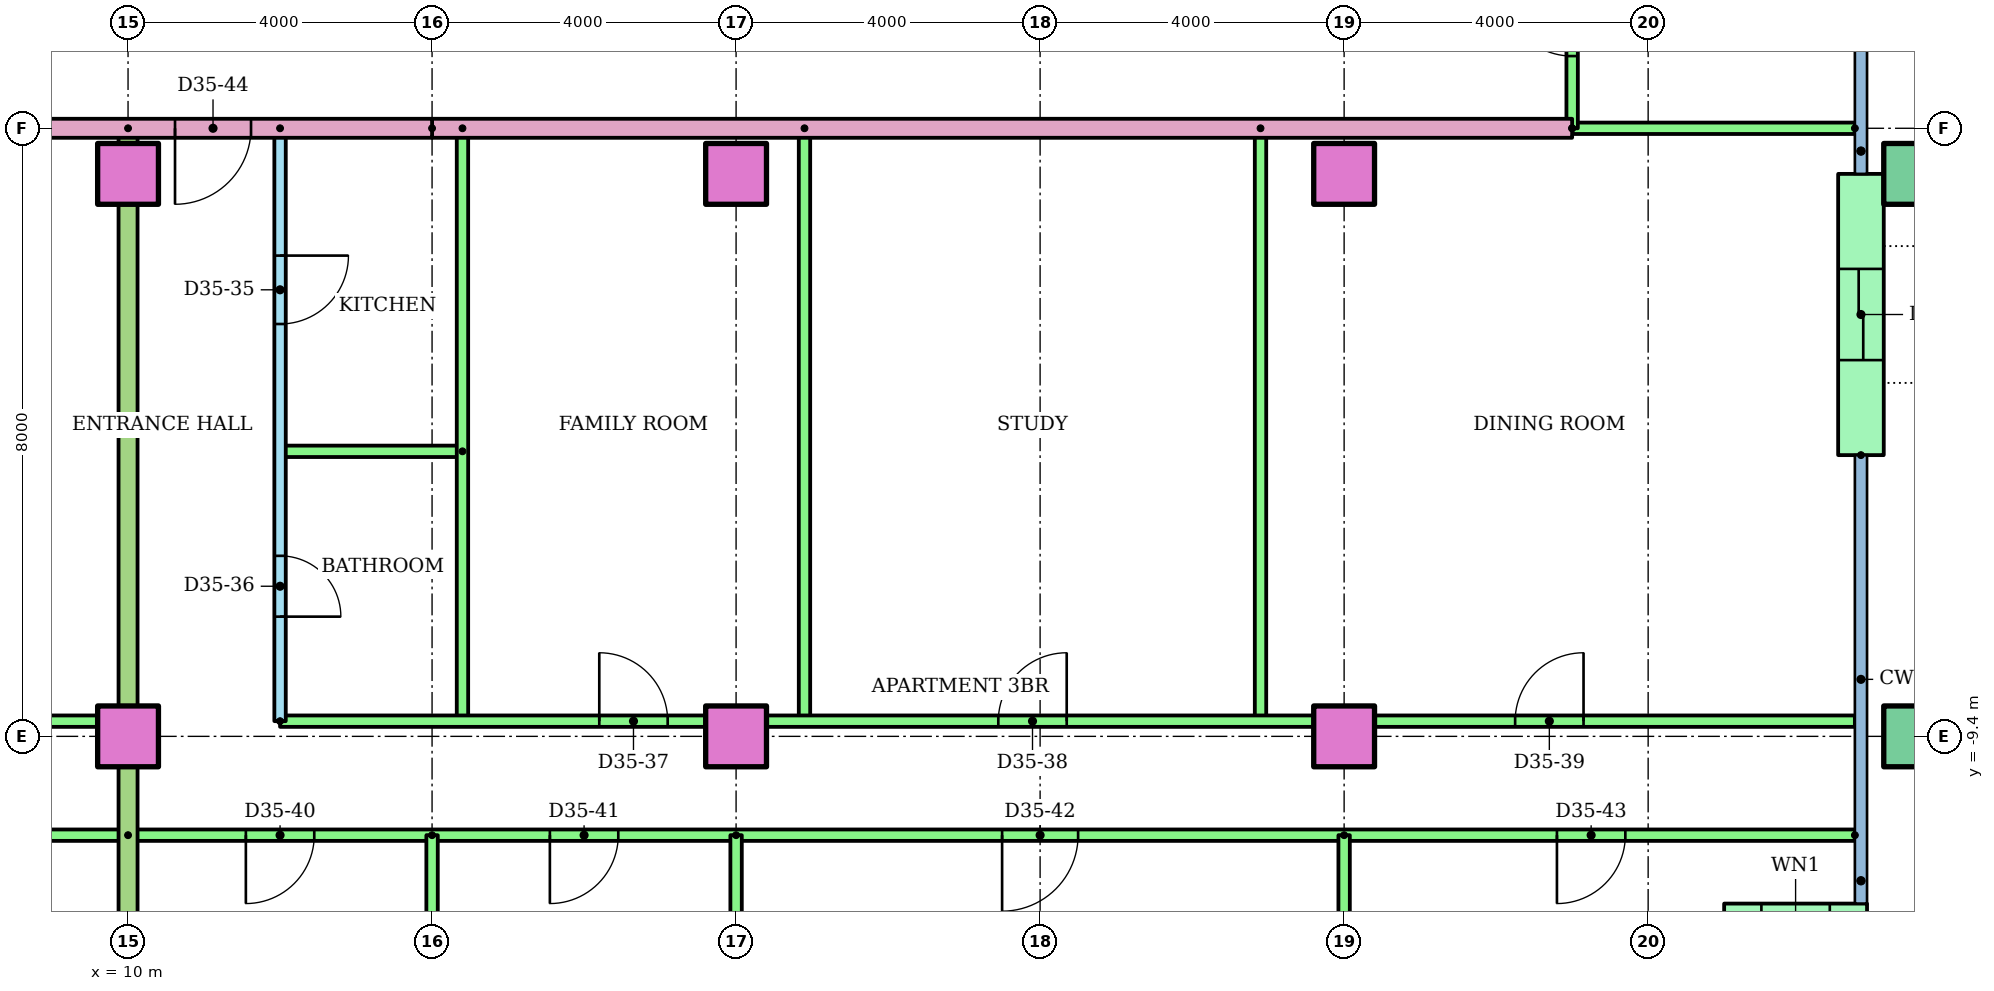
"""IFC4 building model, lengths in metres.
Left out: names, types, materials, properties, quantities, classifications, styles, units other than length and angle.
Written with IfcOpenShell. Run it as: python <this file> out.ifc"""

import sys

from ifc_helpers import new_model, si_unit, direction, frame, frame_2d, origin, origin_2d, place, context, subcontext, project, spatial, rectangle, hollow_rectangle, extrude, element, fill, save


model = new_model("IFC4")
c1 = context("Model", 3, precision=1e-05, world=origin(), true_north=direction((0.0, 1.0)))
c2 = subcontext(c1, "Body", "Model", "MODEL_VIEW")
j1 = project(units=[si_unit("LENGTHUNIT", "METRE"), si_unit("PLANEANGLEUNIT", "RADIAN")], contexts=[c1])
p1 = place(None, origin())
s1 = spatial("IfcSite", under=j1, at=p1, CompositionType="ELEMENT")
p2 = place(p1, origin())
s2 = spatial("IfcBuilding", under=s1, at=p2, CompositionType="ELEMENT")
p3 = place(p2, frame((0.0, 0.0, 135.8)))
s3 = spatial("IfcBuildingStorey", under=s2, at=p3, CompositionType="ELEMENT", Elevation=135.8)
for number, where in (
    (1, (10.0, -9.4, 0.0)),
    (2, (18.0, -9.4, 0.0)),
    (3, (26.0, -9.4, 0.0)),
):
    element("IfcColumn", number, at=place(p3, frame(where)), inside=s3, PredefinedType="COLUMN", context=c2, shape_type="SweptSolid", body=[
        extrude(rectangle(XDim=0.8, YDim=0.8, at=origin_2d()), origin(), (0.0, 0.0, 1.0), 3.2),
    ])
p4 = place(p3, frame((33.5, -9.4, 0.0)))
e4 = element("IfcColumn", 4, at=p4, inside=s3, PredefinedType="COLUMN", context=c2, shape_type="SweptSolid", body=[
    extrude(hollow_rectangle(XDim=0.8, YDim=0.8, WallThickness=0.04, at=origin_2d()), origin(), (0.0, 0.0, 1.0), 3.2),
])
for number, where in (
    (5, (10.0, -2.0, 0.0)),
    (6, (18.0, -2.0, 0.0)),
    (7, (26.0, -2.0, 0.0)),
):
    element("IfcColumn", number, at=place(p3, frame(where)), inside=s3, PredefinedType="COLUMN", context=c2, shape_type="SweptSolid", body=[
        extrude(rectangle(XDim=0.8, YDim=0.8, at=origin_2d()), origin(), (0.0, 0.0, 1.0), 3.2),
    ])
p5 = place(p3, frame((33.5, -2.0, 0.0)))
e8 = element("IfcColumn", 8, at=p5, inside=s3, PredefinedType="COLUMN", context=c2, shape_type="SweptSolid", body=[
    extrude(hollow_rectangle(XDim=0.8, YDim=0.8, WallThickness=0.04, at=origin_2d()), origin(), (0.0, 0.0, 1.0), 3.2),
])
p6 = place(p3, frame((31.0, -11.9, 0.0)))
e9 = element("IfcWall", 9, at=p6, inside=s3, PredefinedType="STANDARD", context=c2, shape_type="SweptSolid", body=[
    extrude(rectangle(XDim=1.88, YDim=0.6, at=frame_2d((0.94, 0.0))), origin(), (0.0, 0.0, 1.0), 2.92),
])
p7 = place(p6, frame((0.49, 0.0, 0.9)))
e10 = element("IfcOpeningElement", 10, at=p7, cuts=e9, PredefinedType="OPENING", context=c2, shape_type="SweptSolid", body=[
    extrude(rectangle(XDim=0.9, YDim=1.5, at=frame_2d((0.45, 0.75))), frame((0.0, 0.31, 0.0), z_axis=(0.0, -1.0, 0.0), x_axis=(1.0, 0.0, 0.0)), (0.0, 0.0, 1.0), 0.62),
])
p8 = place(p3, frame((32.8, -5.7, 0.0), z_axis=(0.0, 0.0, 1.0), x_axis=(0.0, 1.0, 0.0)))
e11 = element("IfcWall", 11, at=p8, inside=s3, PredefinedType="STANDARD", context=c2, shape_type="SweptSolid", body=[
    extrude(rectangle(XDim=3.7, YDim=0.6, at=frame_2d((1.85, 0.0))), origin(), (0.0, 0.0, 1.0), 2.92),
])
p9 = place(p8, frame((1.25, 0.0, 0.0)))
e12 = element("IfcOpeningElement", 12, at=p9, cuts=e11, PredefinedType="OPENING", context=c2, shape_type="SweptSolid", body=[
    extrude(rectangle(XDim=1.2, YDim=2.1, at=frame_2d((0.6, 1.05))), frame((0.0, 0.31, 0.0), z_axis=(0.0, -1.0, 0.0), x_axis=(1.0, 0.0, 0.0)), (0.0, 0.0, 1.0), 0.62),
])
p10 = place(p3, frame((-4.0, -9.2, 0.0)))
e13 = element("IfcWall", 13, at=p10, inside=s3, PredefinedType="PARTITIONING", context=c2, shape_type="SweptSolid", body=[
    extrude(rectangle(XDim=14.0, YDim=0.15, at=frame_2d((7.0, 0.0))), origin(), (0.0, 0.0, 1.0), 2.4),
])
p11 = place(p10, frame((3.45, 0.0, 0.0)))
e14 = element("IfcOpeningElement", 14, at=p11, cuts=e13, PredefinedType="OPENING", context=c2, shape_type="SweptSolid", body=[
    extrude(rectangle(XDim=0.9, YDim=2.1, at=frame_2d((0.45, 1.05))), frame((0.0, 0.085, 0.0), z_axis=(0.0, -1.0, 0.0), x_axis=(1.0, 0.0, 0.0)), (0.0, 0.0, 1.0), 0.17),
])
p12 = place(p10, frame((6.825, 0.0, 0.0)))
e15 = element("IfcOpeningElement", 15, at=p12, cuts=e13, PredefinedType="OPENING", context=c2, shape_type="SweptSolid", body=[
    extrude(rectangle(XDim=0.9, YDim=2.1, at=frame_2d((0.45, 1.05))), frame((0.0, 0.085, 0.0), z_axis=(0.0, -1.0, 0.0), x_axis=(1.0, 0.0, 0.0)), (0.0, 0.0, 1.0), 0.17),
])
p13 = place(p10, frame((11.125, 0.0, 0.0)))
e16 = element("IfcOpeningElement", 16, at=p13, cuts=e13, PredefinedType="OPENING", context=c2, shape_type="SweptSolid", body=[
    extrude(rectangle(XDim=0.9, YDim=2.1, at=frame_2d((0.45, 1.05))), frame((0.0, 0.085, 0.0), z_axis=(0.0, -1.0, 0.0), x_axis=(1.0, 0.0, 0.0)), (0.0, 0.0, 1.0), 0.17),
])
p14 = place(p3, frame((10.0, -10.7, 0.0), z_axis=(0.0, 0.0, 1.0), x_axis=(-1.0, 0.0, 0.0)))
e17 = element("IfcWall", 17, at=p14, inside=s3, PredefinedType="PARTITIONING", context=c2, shape_type="SweptSolid", body=[
    extrude(rectangle(XDim=16.0, YDim=0.15, at=frame_2d((8.0, 0.0))), origin(), (0.0, 0.0, 1.0), 2.4),
])
p15 = place(p14, frame((13.55, 0.0, 0.0)))
e18 = element("IfcOpeningElement", 18, at=p15, cuts=e17, PredefinedType="OPENING", context=c2, shape_type="SweptSolid", body=[
    extrude(rectangle(XDim=0.9, YDim=2.1, at=frame_2d((0.45, 1.05))), frame((0.0, 0.085, 0.0), z_axis=(0.0, -1.0, 0.0), x_axis=(1.0, 0.0, 0.0)), (0.0, 0.0, 1.0), 0.17),
])
p16 = place(p14, frame((9.55, 0.0, 0.0)))
e19 = element("IfcOpeningElement", 19, at=p16, cuts=e17, PredefinedType="OPENING", context=c2, shape_type="SweptSolid", body=[
    extrude(rectangle(XDim=0.9, YDim=2.1, at=frame_2d((0.45, 1.05))), frame((0.0, 0.085, 0.0), z_axis=(0.0, -1.0, 0.0), x_axis=(1.0, 0.0, 0.0)), (0.0, 0.0, 1.0), 0.17),
])
p17 = place(p14, frame((3.5, 0.0, 0.0)))
e20 = element("IfcOpeningElement", 20, at=p17, cuts=e17, PredefinedType="OPENING", context=c2, shape_type="SweptSolid", body=[
    extrude(rectangle(XDim=1.0, YDim=2.1, at=frame_2d((0.5, 1.05))), frame((0.0, 0.085, 0.0), z_axis=(0.0, -1.0, 0.0), x_axis=(1.0, 0.0, 0.0)), (0.0, 0.0, 1.0), 0.17),
])
p18 = place(p3, frame((12.0, -1.4, 0.0), z_axis=(0.0, 0.0, 1.0), x_axis=(0.0, -1.0, 0.0)))
e21 = element("IfcWall", 21, at=p18, inside=s3, PredefinedType="PARTITIONING", context=c2, shape_type="SweptSolid", body=[
    extrude(rectangle(XDim=7.8, YDim=0.15, at=frame_2d((3.9, 0.0))), origin(), (0.0, 0.0, 1.0), 2.4),
])
p19 = place(p18, frame((1.675, 0.0, 0.0)))
e22 = element("IfcOpeningElement", 22, at=p19, cuts=e21, PredefinedType="OPENING", context=c2, shape_type="SweptSolid", body=[
    extrude(rectangle(XDim=0.9, YDim=2.1, at=frame_2d((0.45, 1.05))), frame((0.0, 0.085, 0.0), z_axis=(0.0, -1.0, 0.0), x_axis=(1.0, 0.0, 0.0)), (0.0, 0.0, 1.0), 0.17),
])
p20 = place(p18, frame((5.625, 0.0, 0.0)))
e23 = element("IfcOpeningElement", 23, at=p20, cuts=e21, PredefinedType="OPENING", context=c2, shape_type="SweptSolid", body=[
    extrude(rectangle(XDim=0.8, YDim=2.1, at=frame_2d((0.4, 1.05))), frame((0.0, 0.085, 0.0), z_axis=(0.0, -1.0, 0.0), x_axis=(1.0, 0.0, 0.0)), (0.0, 0.0, 1.0), 0.17),
])
p21 = place(p3, frame((14.4, -5.65, 0.0), z_axis=(0.0, 0.0, 1.0), x_axis=(-1.0, 0.0, 0.0)))
e24 = element("IfcWall", 24, at=p21, inside=s3, PredefinedType="PARTITIONING", context=c2, shape_type="SweptSolid", body=[
    extrude(rectangle(XDim=2.4, YDim=0.15, at=frame_2d((1.2, 0.0))), origin(), (0.0, 0.0, 1.0), 2.4),
])
for number, where, z_axis, x_axis in (
    (25, (14.4, -1.4, 0.0), (0.0, 0.0, 1.0), (0.0, -1.0, 0.0)),
    (26, (18.9, -1.4, 0.0), (0.0, 0.0, 1.0), (0.0, -1.0, 0.0)),
    (27, (24.9, -1.4, 0.0), (0.0, 0.0, 1.0), (0.0, -1.0, 0.0)),
):
    element("IfcWall", number, at=place(p3, frame(where, z_axis=z_axis, x_axis=x_axis)), inside=s3, PredefinedType="PARTITIONING", context=c2, shape_type="SweptSolid", body=[
        extrude(rectangle(XDim=7.8, YDim=0.15, at=frame_2d((3.9, 0.0))), origin(), (0.0, 0.0, 1.0), 2.4),
    ])
p22 = place(p3, frame((12.0, -9.2, 0.0)))
e28 = element("IfcWall", 28, at=p22, inside=s3, PredefinedType="PARTITIONING", context=c2, shape_type="SweptSolid", body=[
    extrude(rectangle(XDim=20.72, YDim=0.15, at=frame_2d((10.36, 0.0))), origin(), (0.0, 0.0, 1.0), 2.4),
])
p23 = place(p22, frame((4.2, 0.0, 0.0)))
e29 = element("IfcOpeningElement", 29, at=p23, cuts=e28, PredefinedType="OPENING", context=c2, shape_type="SweptSolid", body=[
    extrude(rectangle(XDim=0.9, YDim=2.1, at=frame_2d((0.45, 1.05))), frame((0.0, 0.085, 0.0), z_axis=(0.0, -1.0, 0.0), x_axis=(1.0, 0.0, 0.0)), (0.0, 0.0, 1.0), 0.17),
])
p24 = place(p22, frame((9.45, 0.0, 0.0)))
e30 = element("IfcOpeningElement", 30, at=p24, cuts=e28, PredefinedType="OPENING", context=c2, shape_type="SweptSolid", body=[
    extrude(rectangle(XDim=0.9, YDim=2.1, at=frame_2d((0.45, 1.05))), frame((0.0, 0.085, 0.0), z_axis=(0.0, -1.0, 0.0), x_axis=(1.0, 0.0, 0.0)), (0.0, 0.0, 1.0), 0.17),
])
p25 = place(p22, frame((16.25, 0.0, 0.0)))
e31 = element("IfcOpeningElement", 31, at=p25, cuts=e28, PredefinedType="OPENING", context=c2, shape_type="SweptSolid", body=[
    extrude(rectangle(XDim=0.9, YDim=2.1, at=frame_2d((0.45, 1.05))), frame((0.0, 0.085, 0.0), z_axis=(0.0, -1.0, 0.0), x_axis=(1.0, 0.0, 0.0)), (0.0, 0.0, 1.0), 0.17),
])
p26 = place(p3, frame((32.72, -10.7, 0.0), z_axis=(0.0, 0.0, 1.0), x_axis=(-1.0, 0.0, 0.0)))
e32 = element("IfcWall", 32, at=p26, inside=s3, PredefinedType="PARTITIONING", context=c2, shape_type="SweptSolid", body=[
    extrude(rectangle(XDim=22.72, YDim=0.15, at=frame_2d((11.36, 0.0))), origin(), (0.0, 0.0, 1.0), 2.4),
])
p27 = place(p26, frame((20.27, 0.0, 0.0)))
e33 = element("IfcOpeningElement", 33, at=p27, cuts=e32, PredefinedType="OPENING", context=c2, shape_type="SweptSolid", body=[
    extrude(rectangle(XDim=0.9, YDim=2.1, at=frame_2d((0.45, 1.05))), frame((0.0, 0.085, 0.0), z_axis=(0.0, -1.0, 0.0), x_axis=(1.0, 0.0, 0.0)), (0.0, 0.0, 1.0), 0.17),
])
p28 = place(p26, frame((16.27, 0.0, 0.0)))
e34 = element("IfcOpeningElement", 34, at=p28, cuts=e32, PredefinedType="OPENING", context=c2, shape_type="SweptSolid", body=[
    extrude(rectangle(XDim=0.9, YDim=2.1, at=frame_2d((0.45, 1.05))), frame((0.0, 0.085, 0.0), z_axis=(0.0, -1.0, 0.0), x_axis=(1.0, 0.0, 0.0)), (0.0, 0.0, 1.0), 0.17),
])
p29 = place(p26, frame((10.22, 0.0, 0.0)))
e35 = element("IfcOpeningElement", 35, at=p29, cuts=e32, PredefinedType="OPENING", context=c2, shape_type="SweptSolid", body=[
    extrude(rectangle(XDim=1.0, YDim=2.1, at=frame_2d((0.5, 1.05))), frame((0.0, 0.085, 0.0), z_axis=(0.0, -1.0, 0.0), x_axis=(1.0, 0.0, 0.0)), (0.0, 0.0, 1.0), 0.17),
])
p30 = place(p26, frame((3.02, 0.0, 0.0)))
e36 = element("IfcOpeningElement", 36, at=p30, cuts=e32, PredefinedType="OPENING", context=c2, shape_type="SweptSolid", body=[
    extrude(rectangle(XDim=0.9, YDim=2.1, at=frame_2d((0.45, 1.05))), frame((0.0, 0.085, 0.0), z_axis=(0.0, -1.0, 0.0), x_axis=(1.0, 0.0, 0.0)), (0.0, 0.0, 1.0), 0.17),
])
p31 = place(p3, frame((14.0, -10.7, 0.0), z_axis=(0.0, 0.0, 1.0), x_axis=(0.0, -1.0, 0.0)))
e37 = element("IfcWall", 37, at=p31, inside=s3, PredefinedType="PARTITIONING", context=c2, shape_type="SweptSolid", body=[
    extrude(rectangle(XDim=5.621, YDim=0.15, at=frame_2d((2.811, 0.0))), origin(), (0.0, 0.0, 1.0), 2.4),
])
for number, where, z_axis, x_axis in (
    (38, (18.0, -10.7, 0.0), (0.0, 0.0, 1.0), (0.0, -1.0, 0.0)),
    (39, (26.0, -10.7, 0.0), (0.0, 0.0, 1.0), (0.0, -1.0, 0.0)),
):
    element("IfcWall", number, at=place(p3, frame(where, z_axis=z_axis, x_axis=x_axis)), inside=s3, PredefinedType="PARTITIONING", context=c2, shape_type="SweptSolid", body=[
        extrude(rectangle(XDim=5.61, YDim=0.15, at=frame_2d((2.805, 0.0))), origin(), (0.0, 0.0, 1.0), 2.4),
    ])
p32 = place(p3, frame((10.0, -1.4, 0.0), z_axis=(0.0, 0.0, 1.0), x_axis=(0.0, -1.0, 0.0)))
e40 = element("IfcWall", 40, at=p32, inside=s3, PredefinedType="PARTITIONING", context=c2, shape_type="SweptSolid", body=[
    extrude(rectangle(XDim=14.91, YDim=0.25, at=frame_2d((7.455, 0.0))), origin(), (0.0, 0.0, 1.0), 2.4),
])
p33 = place(p3, frame((29.0, -1.4, 0.0), z_axis=(0.0, 0.0, 1.0), x_axis=(-1.0, 0.0, 0.0)))
e41 = element("IfcWall", 41, at=p33, inside=s3, PredefinedType="PARTITIONING", context=c2, shape_type="SweptSolid", body=[
    extrude(rectangle(XDim=15.0, YDim=0.25, at=frame_2d((7.5, 0.0))), origin(), (0.0, 0.0, 1.0), 2.4),
])
p34 = place(p3, frame((32.72, -1.4, 0.0), z_axis=(0.0, 0.0, 1.0), x_axis=(-1.0, 0.0, 0.0)))
e42 = element("IfcWall", 42, at=p34, inside=s3, PredefinedType="PARTITIONING", context=c2, shape_type="SweptSolid", body=[
    extrude(rectangle(XDim=3.72, YDim=0.15, at=frame_2d((1.86, 0.0))), origin(), (0.0, 0.0, 1.0), 2.4),
])
p35 = place(p3, frame((29.0, -1.4, 0.0), z_axis=(0.0, 0.0, 1.0), x_axis=(0.0, 1.0, 0.0)))
e43 = element("IfcWall", 43, at=p35, inside=s3, PredefinedType="PARTITIONING", context=c2, shape_type="SweptSolid", body=[
    extrude(rectangle(XDim=2.8, YDim=0.15, at=frame_2d((1.4, 0.0))), origin(), (0.0, 0.0, 1.0), 2.4),
])
p36 = place(p35, frame((0.95, 0.0, 0.0)))
e44 = element("IfcOpeningElement", 44, at=p36, cuts=e43, PredefinedType="OPENING", context=c2, shape_type="SweptSolid", body=[
    extrude(rectangle(XDim=0.9, YDim=2.1, at=frame_2d((0.45, 1.05))), frame((0.0, 0.085, 0.0), z_axis=(0.0, -1.0, 0.0), x_axis=(1.0, 0.0, 0.0)), (0.0, 0.0, 1.0), 0.17),
])
p37 = place(p3, frame((14.0, -1.4, 0.0), z_axis=(0.0, 0.0, 1.0), x_axis=(-1.0, 0.0, 0.0)))
e45 = element("IfcWall", 45, at=p37, inside=s3, PredefinedType="PARTITIONING", context=c2, shape_type="SweptSolid", body=[
    extrude(rectangle(XDim=28.0, YDim=0.25, at=frame_2d((14.0, 0.0))), origin(), (0.0, 0.0, 1.0), 2.4),
])
p38 = place(p37, frame((20.618, 0.0, 0.0)))
e46 = element("IfcOpeningElement", 46, at=p38, cuts=e45, PredefinedType="OPENING", context=c2, shape_type="SweptSolid", body=[
    extrude(rectangle(XDim=1.0, YDim=2.1, at=frame_2d((0.5, 1.05))), frame((0.0, 0.135, 0.0), z_axis=(0.0, -1.0, 0.0), x_axis=(1.0, 0.0, 0.0)), (0.0, 0.0, 1.0), 0.27),
])
p39 = place(p37, frame((18.382, 0.0, 0.0)))
e47 = element("IfcOpeningElement", 47, at=p39, cuts=e45, PredefinedType="OPENING", context=c2, shape_type="SweptSolid", body=[
    extrude(rectangle(XDim=1.0, YDim=2.1, at=frame_2d((0.5, 1.05))), frame((0.0, 0.135, 0.0), z_axis=(0.0, -1.0, 0.0), x_axis=(1.0, 0.0, 0.0)), (0.0, 0.0, 1.0), 0.27),
])
p40 = place(p37, frame((2.382, 0.0, 0.0)))
e48 = element("IfcOpeningElement", 48, at=p40, cuts=e45, PredefinedType="OPENING", context=c2, shape_type="SweptSolid", body=[
    extrude(rectangle(XDim=1.0, YDim=2.1, at=frame_2d((0.5, 1.05))), frame((0.0, 0.135, 0.0), z_axis=(0.0, -1.0, 0.0), x_axis=(1.0, 0.0, 0.0)), (0.0, 0.0, 1.0), 0.27),
])
p41 = place(p19, origin())
e49 = element("IfcDoor", 49, at=p41, inside=s3, OperationType="SINGLE_SWING_LEFT", PredefinedType="DOOR", context=c2, shape_type="SweptSolid", body=[
    extrude(rectangle(XDim=0.9, YDim=2.1, at=frame_2d((0.45, 1.05))), frame((0.0, 0.025, 0.0), z_axis=(0.0, -1.0, 0.0), x_axis=(1.0, 0.0, 0.0)), (0.0, 0.0, 1.0), 0.05),
])
fill(e22, e49)
p42 = place(p20, origin())
e50 = element("IfcDoor", 50, at=p42, inside=s3, OperationType="SINGLE_SWING_RIGHT", PredefinedType="DOOR", context=c2, shape_type="SweptSolid", body=[
    extrude(rectangle(XDim=0.8, YDim=2.1, at=frame_2d((0.4, 1.05))), frame((0.0, 0.025, 0.0), z_axis=(0.0, -1.0, 0.0), x_axis=(1.0, 0.0, 0.0)), (0.0, 0.0, 1.0), 0.05),
])
fill(e23, e50)
p43 = place(p23, origin())
e51 = element("IfcDoor", 51, at=p43, inside=s3, OperationType="SINGLE_SWING_LEFT", PredefinedType="DOOR", context=c2, shape_type="SweptSolid", body=[
    extrude(rectangle(XDim=0.9, YDim=2.1, at=frame_2d((0.45, 1.05))), frame((0.0, 0.025, 0.0), z_axis=(0.0, -1.0, 0.0), x_axis=(1.0, 0.0, 0.0)), (0.0, 0.0, 1.0), 0.05),
])
fill(e29, e51)
p44 = place(p24, origin())
e52 = element("IfcDoor", 52, at=p44, inside=s3, OperationType="SINGLE_SWING_RIGHT", PredefinedType="DOOR", context=c2, shape_type="SweptSolid", body=[
    extrude(rectangle(XDim=0.9, YDim=2.1, at=frame_2d((0.45, 1.05))), frame((0.0, 0.025, 0.0), z_axis=(0.0, -1.0, 0.0), x_axis=(1.0, 0.0, 0.0)), (0.0, 0.0, 1.0), 0.05),
])
fill(e30, e52)
p45 = place(p25, origin())
e53 = element("IfcDoor", 53, at=p45, inside=s3, OperationType="SINGLE_SWING_RIGHT", PredefinedType="DOOR", context=c2, shape_type="SweptSolid", body=[
    extrude(rectangle(XDim=0.9, YDim=2.1, at=frame_2d((0.45, 1.05))), frame((0.0, 0.025, 0.0), z_axis=(0.0, -1.0, 0.0), x_axis=(1.0, 0.0, 0.0)), (0.0, 0.0, 1.0), 0.05),
])
fill(e31, e53)
p46 = place(p27, origin())
e54 = element("IfcDoor", 54, at=p46, inside=s3, OperationType="SINGLE_SWING_RIGHT", PredefinedType="DOOR", context=c2, shape_type="SweptSolid", body=[
    extrude(rectangle(XDim=0.9, YDim=2.1, at=frame_2d((0.45, 1.05))), frame((0.0, 0.025, 0.0), z_axis=(0.0, -1.0, 0.0), x_axis=(1.0, 0.0, 0.0)), (0.0, 0.0, 1.0), 0.05),
])
fill(e33, e54)
p47 = place(p28, origin())
e55 = element("IfcDoor", 55, at=p47, inside=s3, OperationType="SINGLE_SWING_RIGHT", PredefinedType="DOOR", context=c2, shape_type="SweptSolid", body=[
    extrude(rectangle(XDim=0.9, YDim=2.1, at=frame_2d((0.45, 1.05))), frame((0.0, 0.025, 0.0), z_axis=(0.0, -1.0, 0.0), x_axis=(1.0, 0.0, 0.0)), (0.0, 0.0, 1.0), 0.05),
])
fill(e34, e55)
p48 = place(p29, origin())
e56 = element("IfcDoor", 56, at=p48, inside=s3, OperationType="SINGLE_SWING_RIGHT", PredefinedType="DOOR", context=c2, shape_type="SweptSolid", body=[
    extrude(rectangle(XDim=1.0, YDim=2.1, at=frame_2d((0.5, 1.05))), frame((0.0, 0.025, 0.0), z_axis=(0.0, -1.0, 0.0), x_axis=(1.0, 0.0, 0.0)), (0.0, 0.0, 1.0), 0.05),
])
fill(e35, e56)
p49 = place(p30, origin())
e57 = element("IfcDoor", 57, at=p49, inside=s3, OperationType="SINGLE_SWING_RIGHT", PredefinedType="DOOR", context=c2, shape_type="SweptSolid", body=[
    extrude(rectangle(XDim=0.9, YDim=2.1, at=frame_2d((0.45, 1.05))), frame((0.0, 0.025, 0.0), z_axis=(0.0, -1.0, 0.0), x_axis=(1.0, 0.0, 0.0)), (0.0, 0.0, 1.0), 0.05),
])
fill(e36, e57)
p50 = place(p40, origin())
e58 = element("IfcDoor", 58, at=p50, inside=s3, OperationType="SINGLE_SWING_RIGHT", PredefinedType="DOOR", context=c2, shape_type="SweptSolid", body=[
    extrude(rectangle(XDim=1.0, YDim=2.1, at=frame_2d((0.5, 1.05))), frame((0.0, 0.025, 0.0), z_axis=(0.0, -1.0, 0.0), x_axis=(1.0, 0.0, 0.0)), (0.0, 0.0, 1.0), 0.05),
])
fill(e48, e58)
p51 = place(p36, origin())
e59 = element("IfcDoor", 59, at=p51, inside=s3, OperationType="SINGLE_SWING_RIGHT", PredefinedType="DOOR", context=c2, shape_type="SweptSolid", body=[
    extrude(rectangle(XDim=0.9, YDim=2.1, at=frame_2d((0.45, 1.05))), frame((0.0, 0.025, 0.0), z_axis=(0.0, -1.0, 0.0), x_axis=(1.0, 0.0, 0.0)), (0.0, 0.0, 1.0), 0.05),
])
fill(e44, e59)
p52 = place(p9, origin())
e60 = element("IfcDoor", 60, at=p52, inside=s3, OperationType="SLIDING_TO_LEFT", PredefinedType="DOOR", context=c2, shape_type="SweptSolid", body=[
    extrude(rectangle(XDim=1.2, YDim=2.1, at=frame_2d((0.6, 1.05))), frame((0.0, 0.025, 0.0), z_axis=(0.0, -1.0, 0.0), x_axis=(1.0, 0.0, 0.0)), (0.0, 0.0, 1.0), 0.05),
])
fill(e12, e60)
save(model, sys.argv[1])
